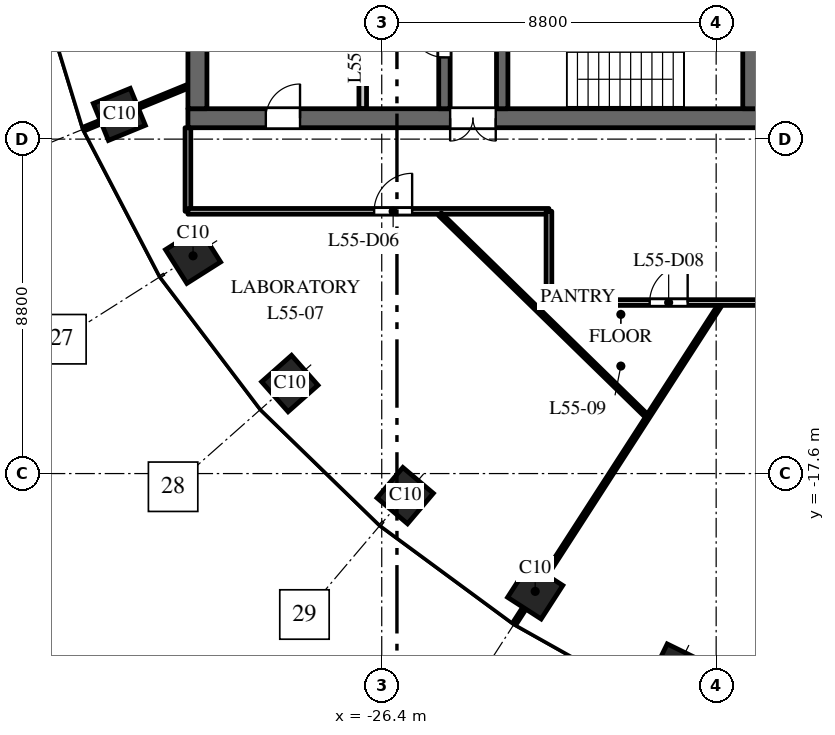
"""IFC4 building model, lengths in metres.
Left out: names, types, materials, properties, quantities, classifications, styles, units other than length and angle.
Written with IfcOpenShell. Run it as: python <this file> out.ifc"""

import sys

from ifc_helpers import new_model, si_unit, direction, frame, frame_2d, origin, origin_2d, place, context, subcontext, project, spatial, rectangle, extrude, element, fill, save


model = new_model("IFC4")
c1 = context("Model", 3, precision=1e-05, world=origin(), true_north=direction((0.0, 1.0)))
c2 = subcontext(c1, "Body", "Model", "MODEL_VIEW")
j1 = project(units=[si_unit("LENGTHUNIT", "METRE"), si_unit("PLANEANGLEUNIT", "RADIAN")], contexts=[c1])
p1 = place(None, origin())
s1 = spatial("IfcSite", under=j1, at=p1, CompositionType="ELEMENT")
p2 = place(p1, origin())
s2 = spatial("IfcBuilding", under=s1, at=p2, CompositionType="ELEMENT")
p3 = place(p2, frame((0.0, 0.0, 261.5)))
s3 = spatial("IfcBuildingStorey", under=s2, at=p3, CompositionType="ELEMENT", Elevation=261.5)
for number, where, z_axis, x_axis in (
    (1, (-33.305, -8.149, 0.0), (0.0, 0.0, 1.0), (0.379, -0.925, 0.0)),
    (2, (-31.365, -11.871, 0.0), (0.0, 0.0, 1.0), (0.535, -0.845, 0.0)),
    (3, (-28.819, -15.23, 0.0), (0.0, 0.0, 1.0), (0.663, -0.749, 0.0)),
    (4, (-25.783, -18.18, 0.0), (0.0, 0.0, 1.0), (0.763, -0.646, 0.0)),
    (5, (-22.362, -20.7, 0.0), (0.0, 0.0, 1.0), (0.84, -0.542, 0.0)),
    (6, (-18.646, -22.785, 0.0), (0.0, 0.0, 1.0), (0.898, -0.439, 0.0)),
):
    element("IfcColumn", number, at=place(p3, frame(where, z_axis=z_axis, x_axis=x_axis)), inside=s3, PredefinedType="COLUMN", context=c2, shape_type="SweptSolid", body=[
        extrude(rectangle(XDim=1.05, YDim=1.05, at=origin_2d()), origin(), (0.0, 0.0, 1.0), 4.0),
    ])
p4 = place(p3, frame((-16.5, -8.25, 0.0), z_axis=(0.0, 0.0, 1.0), x_axis=(-1.0, 0.0, 0.0)))
e7 = element("IfcWall", 7, at=p4, inside=s3, PredefinedType="SHEAR", context=c2, shape_type="SweptSolid", body=[
    extrude(rectangle(XDim=15.0, YDim=0.5, at=frame_2d((7.5, 0.0))), origin(), (0.0, 0.0, 1.0), 3.7),
])
p5 = place(p4, frame((6.9, 0.0, 0.0)))
e8 = element("IfcOpeningElement", 8, at=p5, cuts=e7, PredefinedType="OPENING", context=c2, shape_type="SweptSolid", body=[
    extrude(rectangle(XDim=1.2, YDim=2.1, at=frame_2d((0.6, 1.05))), frame((0.0, 0.26, 0.0), z_axis=(0.0, -1.0, 0.0), x_axis=(1.0, 0.0, 0.0)), (0.0, 0.0, 1.0), 0.52),
])
p6 = place(p4, frame((12.05, 0.0, 0.0)))
e9 = element("IfcOpeningElement", 9, at=p6, cuts=e7, PredefinedType="OPENING", context=c2, shape_type="SweptSolid", body=[
    extrude(rectangle(XDim=0.9, YDim=2.1, at=frame_2d((0.45, 1.05))), frame((0.0, 0.26, 0.0), z_axis=(0.0, -1.0, 0.0), x_axis=(1.0, 0.0, 0.0)), (0.0, 0.0, 1.0), 0.52),
])
p7 = place(p3, frame((-24.75, -8.0, 0.0), z_axis=(0.0, 0.0, 1.0), x_axis=(0.0, 1.0, 0.0)))
e10 = element("IfcWall", 10, at=p7, inside=s3, PredefinedType="SHEAR", context=c2, shape_type="SweptSolid", body=[
    extrude(rectangle(XDim=16.0, YDim=0.3, at=frame_2d((8.0, 0.0))), origin(), (0.0, 0.0, 1.0), 3.7),
])
p8 = place(p7, frame((4.425, 0.0, 0.0)))
e11 = element("IfcOpeningElement", 11, at=p8, cuts=e10, PredefinedType="OPENING", context=c2, shape_type="SweptSolid", body=[
    extrude(rectangle(XDim=1.1, YDim=2.1, at=frame_2d((0.55, 1.05))), frame((0.0, 0.16, 0.0), z_axis=(0.0, -1.0, 0.0), x_axis=(1.0, 0.0, 0.0)), (0.0, 0.0, 1.0), 0.32),
])
p9 = place(p7, frame((7.45, 0.0, 0.0)))
e12 = element("IfcOpeningElement", 12, at=p9, cuts=e10, PredefinedType="OPENING", context=c2, shape_type="SweptSolid", body=[
    extrude(rectangle(XDim=1.1, YDim=2.1, at=frame_2d((0.55, 1.05))), frame((0.0, 0.16, 0.0), z_axis=(0.0, -1.0, 0.0), x_axis=(1.0, 0.0, 0.0)), (0.0, 0.0, 1.0), 0.32),
])
p10 = place(p7, frame((10.475, 0.0, 0.0)))
e13 = element("IfcOpeningElement", 13, at=p10, cuts=e10, PredefinedType="OPENING", context=c2, shape_type="SweptSolid", body=[
    extrude(rectangle(XDim=1.1, YDim=2.1, at=frame_2d((0.55, 1.05))), frame((0.0, 0.16, 0.0), z_axis=(0.0, -1.0, 0.0), x_axis=(1.0, 0.0, 0.0)), (0.0, 0.0, 1.0), 0.32),
])
p11 = place(p7, frame((13.75, 0.0, 0.0)))
e14 = element("IfcOpeningElement", 14, at=p11, cuts=e10, PredefinedType="OPENING", context=c2, shape_type="SweptSolid", body=[
    extrude(rectangle(XDim=0.9, YDim=2.1, at=frame_2d((0.45, 1.05))), frame((0.0, 0.16, 0.0), z_axis=(0.0, -1.0, 0.0), x_axis=(1.0, 0.0, 0.0)), (0.0, 0.0, 1.0), 0.32),
])
p12 = place(p7, frame((1.35, 0.0, 0.0)))
e15 = element("IfcOpeningElement", 15, at=p12, cuts=e10, PredefinedType="OPENING", context=c2, shape_type="SweptSolid", body=[
    extrude(rectangle(XDim=0.9, YDim=2.1, at=frame_2d((0.45, 1.05))), frame((0.0, 0.16, 0.0), z_axis=(0.0, -1.0, 0.0), x_axis=(1.0, 0.0, 0.0)), (0.0, 0.0, 1.0), 0.32),
])
p13 = place(p3, frame((-16.7, -8.0, 0.0), z_axis=(0.0, 0.0, 1.0), x_axis=(0.0, 1.0, 0.0)))
e16 = element("IfcWall", 16, at=p13, inside=s3, PredefinedType="SHEAR", context=c2, shape_type="SweptSolid", body=[
    extrude(rectangle(XDim=16.0, YDim=0.4, at=frame_2d((8.0, 0.0))), origin(), (0.0, 0.0, 1.0), 3.7),
])
p14 = place(p3, frame((-31.25, -8.0, 0.0), z_axis=(0.0, 0.0, 1.0), x_axis=(0.0, 1.0, 0.0)))
e17 = element("IfcWall", 17, at=p14, inside=s3, PredefinedType="SHEAR", context=c2, shape_type="SweptSolid", body=[
    extrude(rectangle(XDim=16.0, YDim=0.5, at=frame_2d((8.0, 0.0))), origin(), (0.0, 0.0, 1.0), 3.7),
])
p15 = place(p3, frame((-26.9, -8.0, 0.0), z_axis=(0.0, 0.0, 1.0), x_axis=(0.0, 1.0, 0.0)))
e18 = element("IfcWall", 18, at=p15, inside=s3, PredefinedType="PARTITIONING", context=c2, shape_type="SweptSolid", body=[
    extrude(rectangle(XDim=3.25, YDim=0.2, at=frame_2d((1.625, 0.0))), origin(), (0.0, 0.0, 1.0), 3.7),
])
p16 = place(p3, frame((-23.23, -8.0, 0.0), z_axis=(0.0, 0.0, 1.0), x_axis=(0.0, 1.0, 0.0)))
e19 = element("IfcWall", 19, at=p16, inside=s3, PredefinedType="SHEAR", context=c2, shape_type="SweptSolid", body=[
    extrude(rectangle(XDim=7.875, YDim=0.3, at=frame_2d((3.938, 0.0))), origin(), (0.0, 0.0, 1.0), 3.7),
])
p17 = place(p16, frame((5.15, 0.0, 0.0)))
e20 = element("IfcOpeningElement", 20, at=p17, cuts=e19, PredefinedType="OPENING", context=c2, shape_type="SweptSolid", body=[
    extrude(rectangle(XDim=1.1, YDim=2.1, at=frame_2d((0.55, 1.05))), frame((0.0, 0.16, 0.0), z_axis=(0.0, -1.0, 0.0), x_axis=(1.0, 0.0, 0.0)), (0.0, 0.0, 1.0), 0.32),
])
p18 = place(p3, frame((-34.234, -8.53, 0.0), z_axis=(0.0, 0.0, 1.0), x_axis=(0.925344112436, 0.379128307542, 0.0)))
e21 = element("IfcWall", 21, at=p18, inside=s3, PredefinedType="PARTITIONING", context=c2, shape_type="SweptSolid", body=[
    extrude(rectangle(XDim=2.954, YDim=0.1, at=frame_2d((1.477, 0.0))), origin(), (0.0, 0.0, 1.0), 3.0),
])
p19 = place(p3, frame((-31.5, -10.7, 0.0), z_axis=(0.0, 0.0, 1.0), x_axis=(0.0, 1.0, 0.0)))
e22 = element("IfcWall", 22, at=p19, inside=s3, PredefinedType="PARTITIONING", context=c2, shape_type="SweptSolid", body=[
    extrude(rectangle(XDim=2.2, YDim=0.15, at=frame_2d((1.1, 0.0))), origin(), (0.0, 0.0, 1.0), 3.7),
])
p20 = place(p3, frame((-31.5, -10.7, 0.0), z_axis=(0.0, 0.0, 1.0), x_axis=(1.0, 0.0, 0.0)))
e23 = element("IfcWall", 23, at=p20, inside=s3, PredefinedType="PARTITIONING", context=c2, shape_type="SweptSolid", body=[
    extrude(rectangle(XDim=9.5, YDim=0.15, at=frame_2d((4.75, 0.0))), origin(), (0.0, 0.0, 1.0), 3.1),
])
p21 = place(p20, frame((4.9, 0.0, 0.0)))
e24 = element("IfcOpeningElement", 24, at=p21, cuts=e23, PredefinedType="OPENING", context=c2, shape_type="SweptSolid", body=[
    extrude(rectangle(XDim=1.0, YDim=2.1, at=frame_2d((0.5, 1.05))), frame((0.0, 0.085, 0.0), z_axis=(0.0, -1.0, 0.0), x_axis=(1.0, 0.0, 0.0)), (0.0, 0.0, 1.0), 0.17),
])
p22 = place(p3, frame((-24.866, -10.778, 0.0), z_axis=(0.0, 0.0, 1.0), x_axis=(0.715632814242, -0.698476681916, 0.0)))
e25 = element("IfcWall", 25, at=p22, inside=s3, PredefinedType="PARTITIONING", context=c2, shape_type="SweptSolid", body=[
    extrude(rectangle(XDim=7.585, YDim=0.1, at=frame_2d((3.792, 0.0))), origin(), (0.0, 0.0, 1.0), 2.75),
])
p23 = place(p3, frame((-22.905, -21.542, 0.0), z_axis=(0.0, 0.0, 1.0), x_axis=(0.542277075573, 0.840199722273, 0.0)))
e26 = element("IfcWall", 26, at=p23, inside=s3, PredefinedType="PARTITIONING", context=c2, shape_type="SweptSolid", body=[
    extrude(rectangle(XDim=9.958, YDim=0.1, at=frame_2d((4.979, 0.0))), origin(), (0.0, 0.0, 1.0), 3.0),
])
p24 = place(p3, frame((-22.0, -13.1, 0.0), z_axis=(0.0, 0.0, 1.0), x_axis=(0.0, 1.0, 0.0)))
e27 = element("IfcWall", 27, at=p24, inside=s3, PredefinedType="PARTITIONING", context=c2, shape_type="SweptSolid", body=[
    extrude(rectangle(XDim=2.4, YDim=0.15, at=frame_2d((1.2, 0.0))), origin(), (0.0, 0.0, 1.0), 3.7),
])
p25 = place(p3, frame((-22.0, -13.1, 0.0), z_axis=(0.0, 0.0, 1.0), x_axis=(1.0, 0.0, 0.0)))
e28 = element("IfcWall", 28, at=p25, inside=s3, PredefinedType="PARTITIONING", context=c2, shape_type="SweptSolid", body=[
    extrude(rectangle(XDim=21.314, YDim=0.15, at=frame_2d((10.657, 0.0))), origin(), (0.0, 0.0, 1.0), 2.75),
])
p26 = place(p25, frame((2.65, 0.0, 0.0)))
e29 = element("IfcOpeningElement", 29, at=p26, cuts=e28, PredefinedType="OPENING", context=c2, shape_type="SweptSolid", body=[
    extrude(rectangle(XDim=1.0, YDim=2.1, at=frame_2d((0.5, 1.05))), frame((0.0, 0.085, 0.0), z_axis=(0.0, -1.0, 0.0), x_axis=(1.0, 0.0, 0.0)), (0.0, 0.0, 1.0), 0.17),
])
p27 = place(p25, frame((19.686, 0.0, 0.0)))
e30 = element("IfcOpeningElement", 30, at=p27, cuts=e28, PredefinedType="OPENING", context=c2, shape_type="SweptSolid", body=[
    extrude(rectangle(XDim=1.0, YDim=2.1, at=frame_2d((0.5, 1.05))), frame((0.0, 0.085, 0.0), z_axis=(0.0, -1.0, 0.0), x_axis=(1.0, 0.0, 0.0)), (0.0, 0.0, 1.0), 0.17),
])
p28 = place(p5, origin())
e31 = element("IfcDoor", 31, at=p28, inside=s3, OperationType="DOUBLE_DOOR_DOUBLE_SWING", PredefinedType="DOOR", context=c2, shape_type="SweptSolid", body=[
    extrude(rectangle(XDim=1.2, YDim=2.1, at=frame_2d((0.6, 1.05))), frame((0.0, 0.025, 0.0), z_axis=(0.0, -1.0, 0.0), x_axis=(1.0, 0.0, 0.0)), (0.0, 0.0, 1.0), 0.05),
])
fill(e8, e31)
p29 = place(p12, origin())
e32 = element("IfcDoor", 32, at=p29, inside=s3, OperationType="SINGLE_SWING_LEFT", PredefinedType="DOOR", context=c2, shape_type="SweptSolid", body=[
    extrude(rectangle(XDim=0.9, YDim=2.1, at=frame_2d((0.45, 1.05))), frame((0.0, 0.025, 0.0), z_axis=(0.0, -1.0, 0.0), x_axis=(1.0, 0.0, 0.0)), (0.0, 0.0, 1.0), 0.05),
])
fill(e15, e32)
p30 = place(p6, origin())
e33 = element("IfcDoor", 33, at=p30, inside=s3, OperationType="SINGLE_SWING_LEFT", PredefinedType="DOOR", context=c2, shape_type="SweptSolid", body=[
    extrude(rectangle(XDim=0.9, YDim=2.1, at=frame_2d((0.45, 1.05))), frame((0.0, 0.025, 0.0), z_axis=(0.0, -1.0, 0.0), x_axis=(1.0, 0.0, 0.0)), (0.0, 0.0, 1.0), 0.05),
])
fill(e9, e33)
p31 = place(p21, origin())
e34 = element("IfcDoor", 34, at=p31, inside=s3, OperationType="SINGLE_SWING_RIGHT", PredefinedType="DOOR", context=c2, shape_type="SweptSolid", body=[
    extrude(rectangle(XDim=1.0, YDim=2.1, at=frame_2d((0.5, 1.05))), frame((0.0, 0.025, 0.0), z_axis=(0.0, -1.0, 0.0), x_axis=(1.0, 0.0, 0.0)), (0.0, 0.0, 1.0), 0.05),
])
fill(e24, e34)
p32 = place(p26, origin())
e35 = element("IfcDoor", 35, at=p32, inside=s3, OperationType="SINGLE_SWING_RIGHT", PredefinedType="DOOR", context=c2, shape_type="SweptSolid", body=[
    extrude(rectangle(XDim=1.0, YDim=2.1, at=frame_2d((0.5, 1.05))), frame((0.0, 0.025, 0.0), z_axis=(0.0, -1.0, 0.0), x_axis=(1.0, 0.0, 0.0)), (0.0, 0.0, 1.0), 0.05),
])
fill(e29, e35)
save(model, sys.argv[1])
